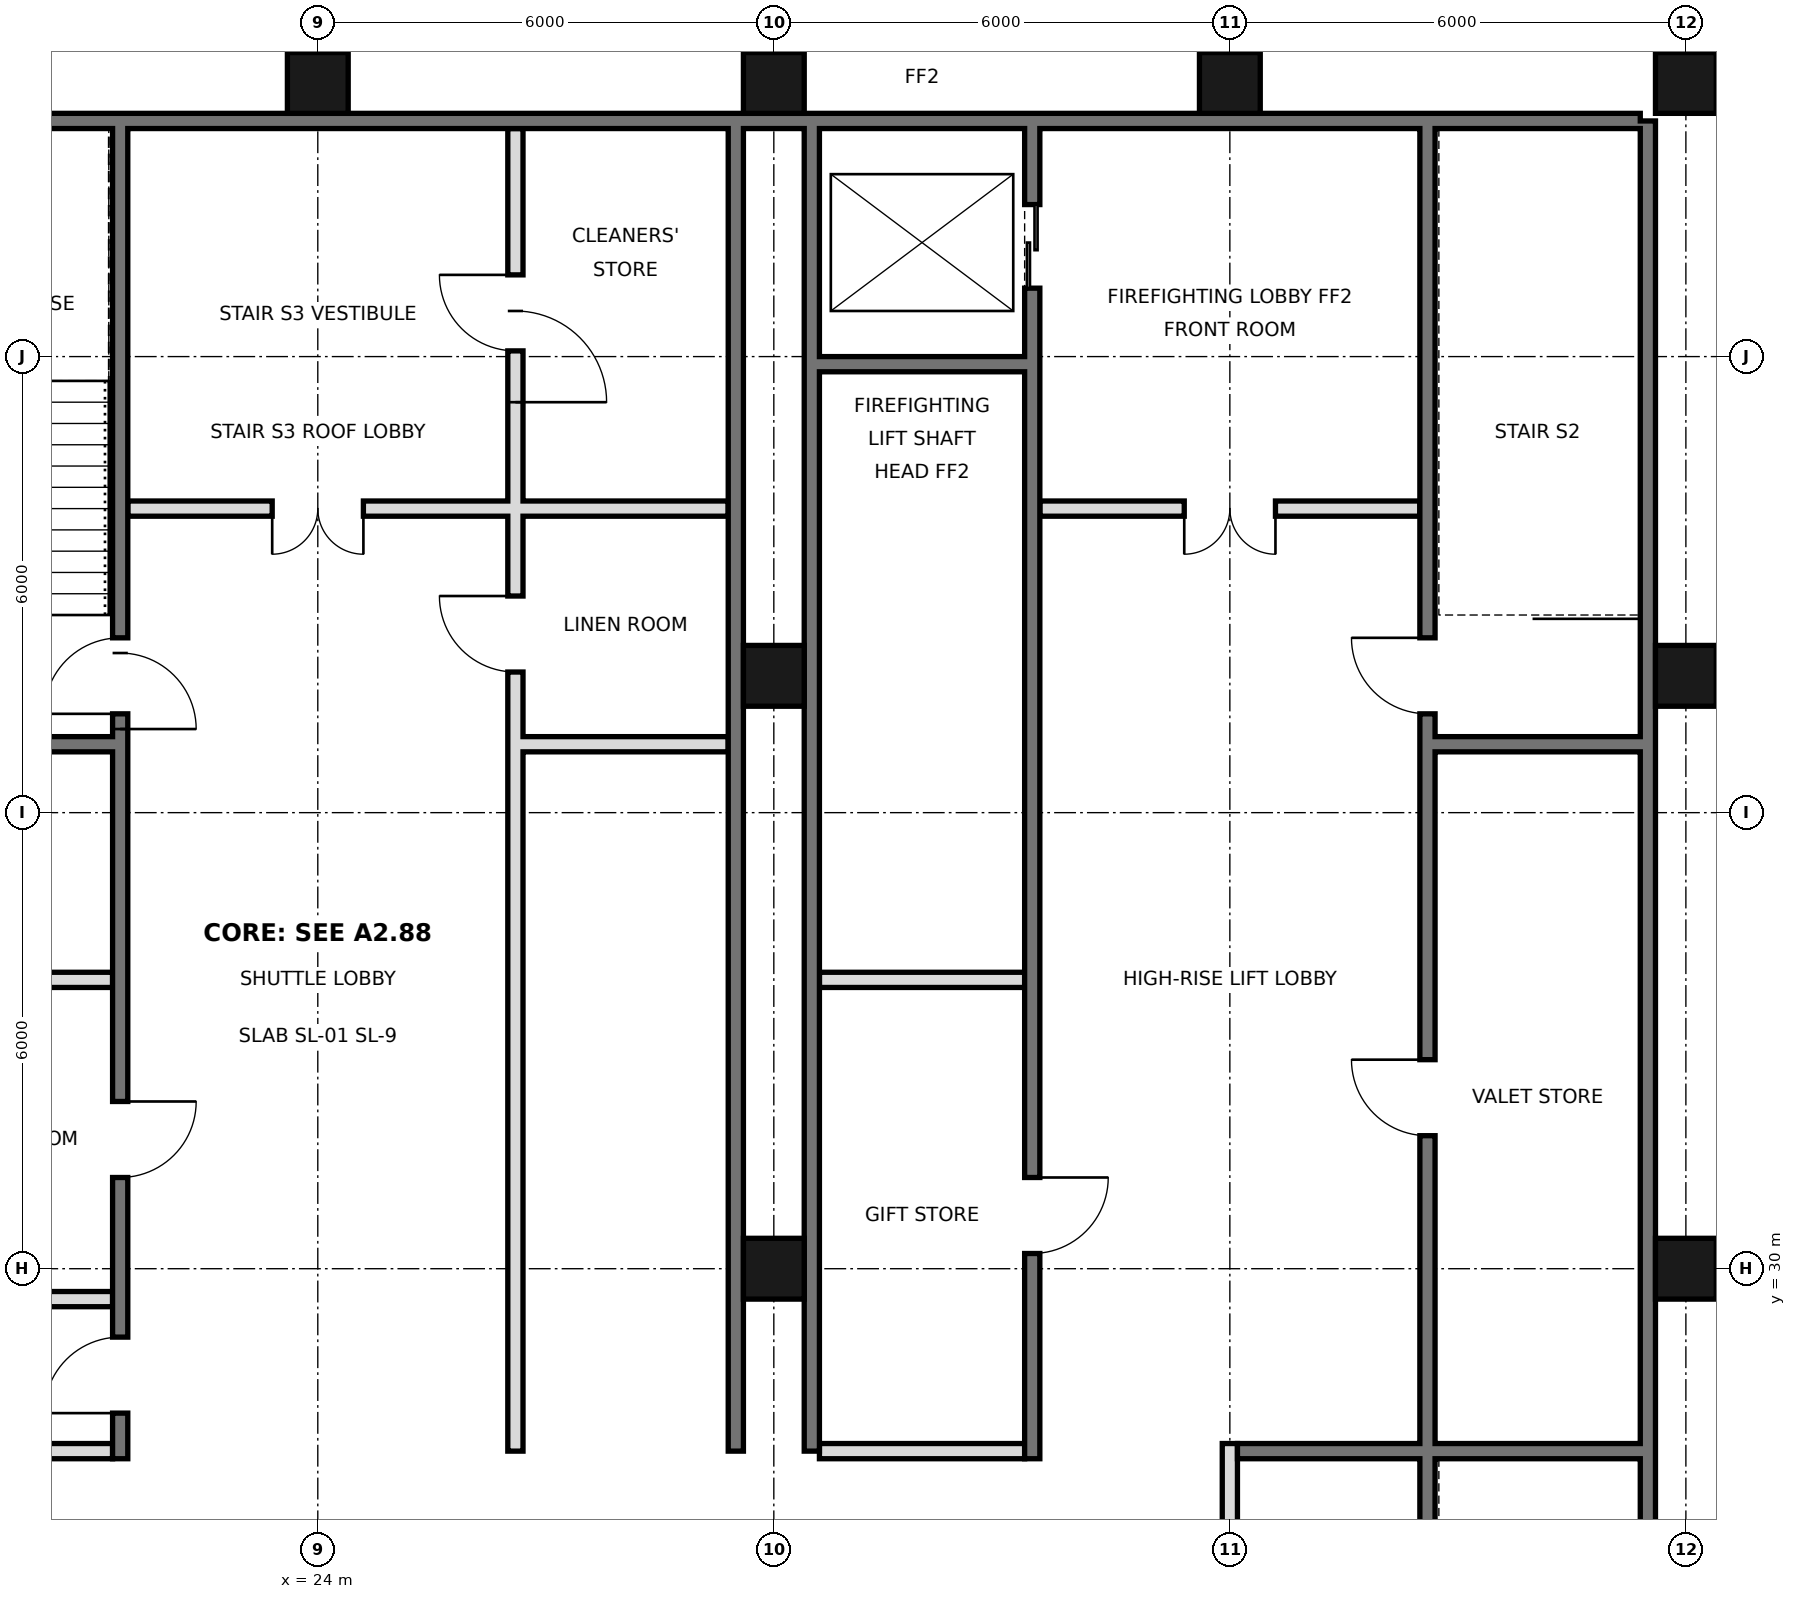
"""IFC4 building model, lengths in metres.
Left out: names, types, materials, properties, quantities, classifications, styles, units other than length and angle.
Written with IfcOpenShell. Run it as: python <this file> out.ifc"""

import sys

from ifc_helpers import new_model, si_unit, direction, frame, frame_2d, origin, origin_2d, place, context, subcontext, project, spatial, rectangle, hollow_rectangle, extrude, element, fill, save


model = new_model("IFC4")
c1 = context("Model", 3, precision=1e-05, world=origin(), true_north=direction((0.0, 1.0)))
c2 = subcontext(c1, "Body", "Model", "MODEL_VIEW")
j1 = project(units=[si_unit("LENGTHUNIT", "METRE"), si_unit("PLANEANGLEUNIT", "RADIAN")], contexts=[c1])
p1 = place(None, origin())
s1 = spatial("IfcSite", under=j1, at=p1, CompositionType="ELEMENT")
p2 = place(p1, origin())
s2 = spatial("IfcBuilding", under=s1, at=p2, CompositionType="ELEMENT")
p3 = place(p2, frame((0.0, 0.0, 353.8)))
s3 = spatial("IfcBuildingStorey", under=s2, at=p3, CompositionType="ELEMENT", Elevation=353.8)
for number, where, z_axis, x_axis in (
    (1, (24.0, 45.6, 0.0), (0.0, 0.0, 1.0), (1.0, 0.0, 0.0)),
    (2, (30.0, 30.0, 0.0), (0.0, 0.0, 1.0), (1.0, 0.0, 0.0)),
    (3, (30.0, 37.8, 0.0), (0.0, 0.0, 1.0), (1.0, 0.0, 0.0)),
    (4, (30.0, 45.6, 0.0), (0.0, 0.0, 1.0), (1.0, 0.0, 0.0)),
    (5, (36.0, 45.6, 0.0), (0.0, 0.0, 1.0), (1.0, 0.0, 0.0)),
    (6, (42.0, 30.0, 0.0), (0.0, 0.0, 1.0), (1.0, 0.0, 0.0)),
    (7, (42.0, 37.8, 0.0), (0.0, 0.0, 1.0), (1.0, 0.0, 0.0)),
    (8, (42.0, 45.6, 0.0), (0.0, 0.0, 1.0), (1.0, 0.0, 0.0)),
):
    element("IfcColumn", number, at=place(p3, frame(where, z_axis=z_axis, x_axis=x_axis)), inside=s3, PredefinedType="COLUMN", context=c2, shape_type="SweptSolid", body=[
        extrude(hollow_rectangle(XDim=0.8, YDim=0.8, WallThickness=0.025, at=origin_2d()), origin(), (0.0, 0.0, 1.0), 3.75),
    ])
p4 = place(p3, frame((41.5, 21.6, 0.0), z_axis=(0.0, 0.0, 1.0), x_axis=(0.0, 1.0, 0.0)))
e9 = element("IfcWall", 9, at=p4, inside=s3, PredefinedType="SOLIDWALL", context=c2, shape_type="SweptSolid", body=[
    extrude(rectangle(XDim=23.5, YDim=0.2, at=frame_2d((11.75, 0.0))), origin(), (0.0, 0.0, 1.0), 3.75),
])
p5 = place(p3, frame((6.6, 45.1, 0.0), z_axis=(0.0, 0.0, 1.0), x_axis=(1.0, 0.0, 0.0)))
e10 = element("IfcWall", 10, at=p5, inside=s3, PredefinedType="SOLIDWALL", context=c2, shape_type="SweptSolid", body=[
    extrude(rectangle(XDim=34.8, YDim=0.2, at=frame_2d((17.4, 0.0))), origin(), (0.0, 0.0, 1.0), 3.75),
])
for number, where, z_axis, x_axis in (
    (11, (29.5, 27.6, 0.0), (0.0, 0.0, 1.0), (0.0, 1.0, 0.0)),
    (12, (30.5, 27.6, 0.0), (0.0, 0.0, 1.0), (0.0, 1.0, 0.0)),
):
    element("IfcWall", number, at=place(p3, frame(where, z_axis=z_axis, x_axis=x_axis)), inside=s3, PredefinedType="SOLIDWALL", context=c2, shape_type="SweptSolid", body=[
        extrude(rectangle(XDim=17.5, YDim=0.2, at=frame_2d((8.75, 0.0))), origin(), (0.0, 0.0, 1.0), 3.75),
    ])
p6 = place(p3, frame((21.4, 27.5, 0.0), z_axis=(0.0, 0.0, 1.0), x_axis=(0.0, 1.0, 0.0)))
e13 = element("IfcWall", 13, at=p6, inside=s3, PredefinedType="SOLIDWALL", context=c2, shape_type="SweptSolid", body=[
    extrude(rectangle(XDim=17.5, YDim=0.2, at=frame_2d((8.75, 0.0))), origin(), (0.0, 0.0, 1.0), 3.75),
])
p7 = place(p6, frame((0.6, 0.0, 0.0)))
e14 = element("IfcOpeningElement", 14, at=p7, cuts=e13, PredefinedType="OPENING", context=c2, shape_type="SweptSolid", body=[
    extrude(rectangle(XDim=1.0, YDim=2.1, at=frame_2d((0.5, 1.05))), frame((0.0, 0.11, 0.0), z_axis=(0.0, -1.0, 0.0), x_axis=(1.0, 0.0, 0.0)), (0.0, 0.0, 1.0), 0.22),
])
p8 = place(p6, frame((3.7, 0.0, 0.0)))
e15 = element("IfcOpeningElement", 15, at=p8, cuts=e13, PredefinedType="OPENING", context=c2, shape_type="SweptSolid", body=[
    extrude(rectangle(XDim=1.0, YDim=2.1, at=frame_2d((0.5, 1.05))), frame((0.0, 0.11, 0.0), z_axis=(0.0, -1.0, 0.0), x_axis=(1.0, 0.0, 0.0)), (0.0, 0.0, 1.0), 0.22),
])
p9 = place(p6, frame((9.8, 0.0, 0.0)))
e16 = element("IfcOpeningElement", 16, at=p9, cuts=e13, PredefinedType="OPENING", context=c2, shape_type="SweptSolid", body=[
    extrude(rectangle(XDim=1.0, YDim=2.1, at=frame_2d((0.5, 1.05))), frame((0.0, 0.11, 0.0), z_axis=(0.0, -1.0, 0.0), x_axis=(1.0, 0.0, 0.0)), (0.0, 0.0, 1.0), 0.22),
])
p10 = place(p3, frame((26.6, 27.6, 0.0), z_axis=(0.0, 0.0, 1.0), x_axis=(0.0, 1.0, 0.0)))
e17 = element("IfcWall", 17, at=p10, inside=s3, PredefinedType="PARTITIONING", context=c2, shape_type="SweptSolid", body=[
    extrude(rectangle(XDim=17.4, YDim=0.2, at=frame_2d((8.7, 0.0))), origin(), (0.0, 0.0, 1.0), 3.75),
])
p11 = place(p10, frame((10.25, 0.0, 0.0)))
e18 = element("IfcOpeningElement", 18, at=p11, cuts=e17, PredefinedType="OPENING", context=c2, shape_type="SweptSolid", body=[
    extrude(rectangle(XDim=1.0, YDim=2.1, at=frame_2d((0.5, 1.05))), frame((0.0, 0.11, 0.0), z_axis=(0.0, -1.0, 0.0), x_axis=(1.0, 0.0, 0.0)), (0.0, 0.0, 1.0), 0.22),
])
p12 = place(p10, frame((14.475, 0.0, 0.0)))
e19 = element("IfcOpeningElement", 19, at=p12, cuts=e17, PredefinedType="OPENING", context=c2, shape_type="SweptSolid", body=[
    extrude(rectangle(XDim=1.0, YDim=2.1, at=frame_2d((0.5, 1.05))), frame((0.0, 0.11, 0.0), z_axis=(0.0, -1.0, 0.0), x_axis=(1.0, 0.0, 0.0)), (0.0, 0.0, 1.0), 0.22),
])
p13 = place(p3, frame((33.4, 27.5, 0.0), z_axis=(0.0, 0.0, 1.0), x_axis=(0.0, 1.0, 0.0)))
e20 = element("IfcWall", 20, at=p13, inside=s3, PredefinedType="SOLIDWALL", context=c2, shape_type="SweptSolid", body=[
    extrude(rectangle(XDim=17.5, YDim=0.2, at=frame_2d((8.75, 0.0))), origin(), (0.0, 0.0, 1.0), 3.75),
])
p14 = place(p13, frame((15.4, 0.0, 0.0)))
e21 = element("IfcOpeningElement", 21, at=p14, cuts=e20, PredefinedType="OPENING", context=c2, shape_type="SweptSolid", body=[
    extrude(rectangle(XDim=1.1, YDim=2.1, at=frame_2d((0.55, 1.05))), frame((0.0, 0.11, 0.0), z_axis=(0.0, -1.0, 0.0), x_axis=(1.0, 0.0, 0.0)), (0.0, 0.0, 1.0), 0.22),
])
p15 = place(p13, frame((2.7, 0.0, 0.0)))
e22 = element("IfcOpeningElement", 22, at=p15, cuts=e20, PredefinedType="OPENING", context=c2, shape_type="SweptSolid", body=[
    extrude(rectangle(XDim=1.0, YDim=2.1, at=frame_2d((0.5, 1.05))), frame((0.0, 0.11, 0.0), z_axis=(0.0, -1.0, 0.0), x_axis=(1.0, 0.0, 0.0)), (0.0, 0.0, 1.0), 0.22),
])
p16 = place(p3, frame((36.0, 21.5, 0.0), z_axis=(0.0, 0.0, 1.0), x_axis=(0.0, 1.0, 0.0)))
e23 = element("IfcWall", 23, at=p16, inside=s3, PredefinedType="PARTITIONING", context=c2, shape_type="SweptSolid", body=[
    extrude(rectangle(XDim=6.2, YDim=0.2, at=frame_2d((3.1, 0.0))), origin(), (0.0, 0.0, 1.0), 3.75),
])
p17 = place(p3, frame((38.6, 21.5, 0.0), z_axis=(0.0, 0.0, 1.0), x_axis=(0.0, 1.0, 0.0)))
e24 = element("IfcWall", 24, at=p17, inside=s3, PredefinedType="SOLIDWALL", context=c2, shape_type="SweptSolid", body=[
    extrude(rectangle(XDim=23.5, YDim=0.2, at=frame_2d((11.75, 0.0))), origin(), (0.0, 0.0, 1.0), 3.75),
])
p18 = place(p17, frame((10.25, 0.0, 0.0)))
e25 = element("IfcOpeningElement", 25, at=p18, cuts=e24, PredefinedType="OPENING", context=c2, shape_type="SweptSolid", body=[
    extrude(rectangle(XDim=1.0, YDim=2.1, at=frame_2d((0.5, 1.05))), frame((0.0, 0.11, 0.0), z_axis=(0.0, -1.0, 0.0), x_axis=(1.0, 0.0, 0.0)), (0.0, 0.0, 1.0), 0.22),
])
p19 = place(p17, frame((15.8, 0.0, 0.0)))
e26 = element("IfcOpeningElement", 26, at=p19, cuts=e24, PredefinedType="OPENING", context=c2, shape_type="SweptSolid", body=[
    extrude(rectangle(XDim=1.0, YDim=2.1, at=frame_2d((0.5, 1.05))), frame((0.0, 0.11, 0.0), z_axis=(0.0, -1.0, 0.0), x_axis=(1.0, 0.0, 0.0)), (0.0, 0.0, 1.0), 0.22),
])
p20 = place(p17, frame((0.275, 0.0, 0.0)))
e27 = element("IfcOpeningElement", 27, at=p20, cuts=e24, PredefinedType="OPENING", context=c2, shape_type="SweptSolid", body=[
    extrude(rectangle(XDim=0.9, YDim=2.1, at=frame_2d((0.45, 1.05))), frame((0.0, 0.11, 0.0), z_axis=(0.0, -1.0, 0.0), x_axis=(1.0, 0.0, 0.0)), (0.0, 0.0, 1.0), 0.22),
])
for number, where, z_axis, x_axis in (
    (28, (18.6, 27.6, 0.0), (0.0, 0.0, 1.0), (1.0, 0.0, 0.0)),
    (29, (30.6, 27.6, 0.0), (0.0, 0.0, 1.0), (1.0, 0.0, 0.0)),
):
    element("IfcWall", number, at=place(p3, frame(where, z_axis=z_axis, x_axis=x_axis)), inside=s3, PredefinedType="PARTITIONING", context=c2, shape_type="SweptSolid", body=[
        extrude(rectangle(XDim=2.7, YDim=0.2, at=frame_2d((1.35, 0.0))), origin(), (0.0, 0.0, 1.0), 3.75),
    ])
p21 = place(p3, frame((36.1, 27.6, 0.0), z_axis=(0.0, 0.0, 1.0), x_axis=(1.0, 0.0, 0.0)))
e30 = element("IfcWall", 30, at=p21, inside=s3, PredefinedType="SOLIDWALL", context=c2, shape_type="SweptSolid", body=[
    extrude(rectangle(XDim=5.3, YDim=0.2, at=frame_2d((2.65, 0.0))), origin(), (0.0, 0.0, 1.0), 3.75),
])
for number, where, z_axis, x_axis in (
    (31, (18.6, 29.6, 0.0), (0.0, 0.0, 1.0), (1.0, 0.0, 0.0)),
    (32, (18.6, 33.8, 0.0), (0.0, 0.0, 1.0), (1.0, 0.0, 0.0)),
    (33, (30.6, 33.8, 0.0), (0.0, 0.0, 1.0), (1.0, 0.0, 0.0)),
):
    element("IfcWall", number, at=place(p3, frame(where, z_axis=z_axis, x_axis=x_axis)), inside=s3, PredefinedType="PARTITIONING", context=c2, shape_type="SweptSolid", body=[
        extrude(rectangle(XDim=2.7, YDim=0.2, at=frame_2d((1.35, 0.0))), origin(), (0.0, 0.0, 1.0), 3.75),
    ])
p22 = place(p3, frame((18.6, 36.9, 0.0), z_axis=(0.0, 0.0, 1.0), x_axis=(1.0, 0.0, 0.0)))
e34 = element("IfcWall", 34, at=p22, inside=s3, PredefinedType="SOLIDWALL", context=c2, shape_type="SweptSolid", body=[
    extrude(rectangle(XDim=2.7, YDim=0.2, at=frame_2d((1.35, 0.0))), origin(), (0.0, 0.0, 1.0), 3.75),
])
p23 = place(p3, frame((26.7, 36.9, 0.0), z_axis=(0.0, 0.0, 1.0), x_axis=(1.0, 0.0, 0.0)))
e35 = element("IfcWall", 35, at=p23, inside=s3, PredefinedType="PARTITIONING", context=c2, shape_type="SweptSolid", body=[
    extrude(rectangle(XDim=2.7, YDim=0.2, at=frame_2d((1.35, 0.0))), origin(), (0.0, 0.0, 1.0), 3.75),
])
p24 = place(p3, frame((38.7, 36.9, 0.0), z_axis=(0.0, 0.0, 1.0), x_axis=(1.0, 0.0, 0.0)))
e36 = element("IfcWall", 36, at=p24, inside=s3, PredefinedType="SOLIDWALL", context=c2, shape_type="SweptSolid", body=[
    extrude(rectangle(XDim=2.7, YDim=0.2, at=frame_2d((1.35, 0.0))), origin(), (0.0, 0.0, 1.0), 3.75),
])
p25 = place(p3, frame((21.5, 40.0, 0.0), z_axis=(0.0, 0.0, 1.0), x_axis=(1.0, 0.0, 0.0)))
e37 = element("IfcWall", 37, at=p25, inside=s3, PredefinedType="PARTITIONING", context=c2, shape_type="SweptSolid", body=[
    extrude(rectangle(XDim=7.9, YDim=0.2, at=frame_2d((3.95, 0.0))), origin(), (0.0, 0.0, 1.0), 3.75),
])
p26 = place(p25, frame((1.9, 0.0, 0.0)))
e38 = element("IfcOpeningElement", 38, at=p26, cuts=e37, PredefinedType="OPENING", context=c2, shape_type="SweptSolid", body=[
    extrude(rectangle(XDim=1.2, YDim=2.1, at=frame_2d((0.6, 1.05))), frame((0.0, 0.11, 0.0), z_axis=(0.0, -1.0, 0.0), x_axis=(1.0, 0.0, 0.0)), (0.0, 0.0, 1.0), 0.22),
])
p27 = place(p3, frame((33.5, 40.0, 0.0), z_axis=(0.0, 0.0, 1.0), x_axis=(1.0, 0.0, 0.0)))
e39 = element("IfcWall", 39, at=p27, inside=s3, PredefinedType="PARTITIONING", context=c2, shape_type="SweptSolid", body=[
    extrude(rectangle(XDim=5.0, YDim=0.2, at=frame_2d((2.5, 0.0))), origin(), (0.0, 0.0, 1.0), 3.75),
])
p28 = place(p27, frame((1.9, 0.0, 0.0)))
e40 = element("IfcOpeningElement", 40, at=p28, cuts=e39, PredefinedType="OPENING", context=c2, shape_type="SweptSolid", body=[
    extrude(rectangle(XDim=1.2, YDim=2.1, at=frame_2d((0.6, 1.05))), frame((0.0, 0.11, 0.0), z_axis=(0.0, -1.0, 0.0), x_axis=(1.0, 0.0, 0.0)), (0.0, 0.0, 1.0), 0.22),
])
p29 = place(p3, frame((30.6, 41.9, 0.0), z_axis=(0.0, 0.0, 1.0), x_axis=(1.0, 0.0, 0.0)))
e41 = element("IfcWall", 41, at=p29, inside=s3, PredefinedType="SOLIDWALL", context=c2, shape_type="SweptSolid", body=[
    extrude(rectangle(XDim=2.7, YDim=0.2, at=frame_2d((1.35, 0.0))), origin(), (0.0, 0.0, 1.0), 3.75),
])
p30 = place(p26, frame((1.2, 0.0, 0.0), z_axis=(0.0, 0.0, 1.0), x_axis=(-1.0, 0.0, 0.0)))
e42 = element("IfcDoor", 42, at=p30, inside=s3, OperationType="DOUBLE_DOOR_SINGLE_SWING", PredefinedType="DOOR", context=c2, shape_type="SweptSolid", body=[
    extrude(rectangle(XDim=1.2, YDim=2.1, at=frame_2d((0.6, 1.05))), frame((0.0, 0.025, 0.0), z_axis=(0.0, -1.0, 0.0), x_axis=(1.0, 0.0, 0.0)), (0.0, 0.0, 1.0), 0.05),
])
fill(e38, e42)
p31 = place(p28, frame((1.2, 0.0, 0.0), z_axis=(0.0, 0.0, 1.0), x_axis=(-1.0, 0.0, 0.0)))
e43 = element("IfcDoor", 43, at=p31, inside=s3, OperationType="DOUBLE_DOOR_SINGLE_SWING", PredefinedType="DOOR", context=c2, shape_type="SweptSolid", body=[
    extrude(rectangle(XDim=1.2, YDim=2.1, at=frame_2d((0.6, 1.05))), frame((0.0, 0.025, 0.0), z_axis=(0.0, -1.0, 0.0), x_axis=(1.0, 0.0, 0.0)), (0.0, 0.0, 1.0), 0.05),
])
fill(e40, e43)
p32 = place(p14, origin())
e44 = element("IfcDoor", 44, at=p32, inside=s3, OperationType="DOUBLE_DOOR_SLIDING", PredefinedType="DOOR", context=c2, shape_type="SweptSolid", body=[
    extrude(rectangle(XDim=1.1, YDim=2.1, at=frame_2d((0.55, 1.05))), frame((0.0, 0.025, 0.0), z_axis=(0.0, -1.0, 0.0), x_axis=(1.0, 0.0, 0.0)), (0.0, 0.0, 1.0), 0.05),
])
fill(e21, e44)
p33 = place(p7, origin())
e45 = element("IfcDoor", 45, at=p33, inside=s3, OperationType="SINGLE_SWING_LEFT", PredefinedType="DOOR", context=c2, shape_type="SweptSolid", body=[
    extrude(rectangle(XDim=1.0, YDim=2.1, at=frame_2d((0.5, 1.05))), frame((0.0, 0.025, 0.0), z_axis=(0.0, -1.0, 0.0), x_axis=(1.0, 0.0, 0.0)), (0.0, 0.0, 1.0), 0.05),
])
fill(e14, e45)
p34 = place(p8, origin())
e46 = element("IfcDoor", 46, at=p34, inside=s3, OperationType="SINGLE_SWING_RIGHT", PredefinedType="DOOR", context=c2, shape_type="SweptSolid", body=[
    extrude(rectangle(XDim=1.0, YDim=2.1, at=frame_2d((0.5, 1.05))), frame((0.0, 0.025, 0.0), z_axis=(0.0, -1.0, 0.0), x_axis=(1.0, 0.0, 0.0)), (0.0, 0.0, 1.0), 0.05),
])
fill(e15, e46)
p35 = place(p18, frame((1.0, 0.0, 0.0), z_axis=(0.0, 0.0, 1.0), x_axis=(-1.0, 0.0, 0.0)))
e47 = element("IfcDoor", 47, at=p35, inside=s3, OperationType="SINGLE_SWING_LEFT", PredefinedType="DOOR", context=c2, shape_type="SweptSolid", body=[
    extrude(rectangle(XDim=1.0, YDim=2.1, at=frame_2d((0.5, 1.05))), frame((0.0, 0.025, 0.0), z_axis=(0.0, -1.0, 0.0), x_axis=(1.0, 0.0, 0.0)), (0.0, 0.0, 1.0), 0.05),
])
fill(e25, e47)
p36 = place(p15, origin())
e48 = element("IfcDoor", 48, at=p36, inside=s3, OperationType="SINGLE_SWING_RIGHT", PredefinedType="DOOR", context=c2, shape_type="SweptSolid", body=[
    extrude(rectangle(XDim=1.0, YDim=2.1, at=frame_2d((0.5, 1.05))), frame((0.0, 0.025, 0.0), z_axis=(0.0, -1.0, 0.0), x_axis=(1.0, 0.0, 0.0)), (0.0, 0.0, 1.0), 0.05),
])
fill(e22, e48)
p37 = place(p19, frame((1.0, 0.0, 0.0), z_axis=(0.0, 0.0, 1.0), x_axis=(-1.0, 0.0, 0.0)))
e49 = element("IfcDoor", 49, at=p37, inside=s3, OperationType="SINGLE_SWING_LEFT", PredefinedType="DOOR", context=c2, shape_type="SweptSolid", body=[
    extrude(rectangle(XDim=1.0, YDim=2.1, at=frame_2d((0.5, 1.05))), frame((0.0, 0.025, 0.0), z_axis=(0.0, -1.0, 0.0), x_axis=(1.0, 0.0, 0.0)), (0.0, 0.0, 1.0), 0.05),
])
fill(e26, e49)
p38 = place(p9, origin())
e50 = element("IfcDoor", 50, at=p38, inside=s3, OperationType="SINGLE_SWING_LEFT", PredefinedType="DOOR", context=c2, shape_type="SweptSolid", body=[
    extrude(rectangle(XDim=1.0, YDim=2.1, at=frame_2d((0.5, 1.05))), frame((0.0, 0.025, 0.0), z_axis=(0.0, -1.0, 0.0), x_axis=(1.0, 0.0, 0.0)), (0.0, 0.0, 1.0), 0.05),
])
fill(e16, e50)
p39 = place(p11, frame((1.0, 0.0, 0.0), z_axis=(0.0, 0.0, 1.0), x_axis=(-1.0, 0.0, 0.0)))
e51 = element("IfcDoor", 51, at=p39, inside=s3, OperationType="SINGLE_SWING_LEFT", PredefinedType="DOOR", context=c2, shape_type="SweptSolid", body=[
    extrude(rectangle(XDim=1.0, YDim=2.1, at=frame_2d((0.5, 1.05))), frame((0.0, 0.025, 0.0), z_axis=(0.0, -1.0, 0.0), x_axis=(1.0, 0.0, 0.0)), (0.0, 0.0, 1.0), 0.05),
])
fill(e18, e51)
p40 = place(p12, frame((1.0, 0.0, 0.0), z_axis=(0.0, 0.0, 1.0), x_axis=(-1.0, 0.0, 0.0)))
e52 = element("IfcDoor", 52, at=p40, inside=s3, OperationType="SINGLE_SWING_LEFT", PredefinedType="DOOR", context=c2, shape_type="SweptSolid", body=[
    extrude(rectangle(XDim=1.0, YDim=2.1, at=frame_2d((0.5, 1.05))), frame((0.0, 0.025, 0.0), z_axis=(0.0, -1.0, 0.0), x_axis=(1.0, 0.0, 0.0)), (0.0, 0.0, 1.0), 0.05),
])
fill(e19, e52)
p41 = place(p2, frame((0.0, 0.0, 357.8)))
p42 = place(p41, frame((21.4, 37.0, 0.0), z_axis=(0.0, 0.0, 1.0), x_axis=(0.0, 1.0, 0.0)))
p43 = place(p42, frame((0.1, 0.0, 0.0)))
p44 = place(p43, frame((1.0, 0.0, 0.0), z_axis=(0.0, 0.0, 1.0), x_axis=(-1.0, 0.0, 0.0)))
e53 = element("IfcDoor", 53, at=p44, inside=s3, OperationType="SINGLE_SWING_RIGHT", PredefinedType="DOOR", context=c2, shape_type="SweptSolid", body=[
    extrude(rectangle(XDim=1.0, YDim=2.1, at=frame_2d((0.5, 1.05))), frame((0.0, 0.025, 0.0), z_axis=(0.0, -1.0, 0.0), x_axis=(1.0, 0.0, 0.0)), (0.0, 0.0, 1.0), 0.05),
])
p45 = place(p41, frame((26.6, 36.8, 0.0), z_axis=(0.0, 0.0, 1.0), x_axis=(0.0, 1.0, 0.0)))
p46 = place(p45, frame((4.6, 0.0, 0.0)))
p47 = place(p46, frame((1.2, 0.0, 0.0), z_axis=(0.0, 0.0, 1.0), x_axis=(-1.0, 0.0, 0.0)))
e54 = element("IfcDoor", 54, at=p47, inside=s3, OperationType="SINGLE_SWING_RIGHT", PredefinedType="DOOR", context=c2, shape_type="SweptSolid", body=[
    extrude(rectangle(XDim=1.2, YDim=2.1, at=frame_2d((0.6, 1.05))), frame((0.0, 0.025, 0.0), z_axis=(0.0, -1.0, 0.0), x_axis=(1.0, 0.0, 0.0)), (0.0, 0.0, 1.0), 0.05),
])
save(model, sys.argv[1])
